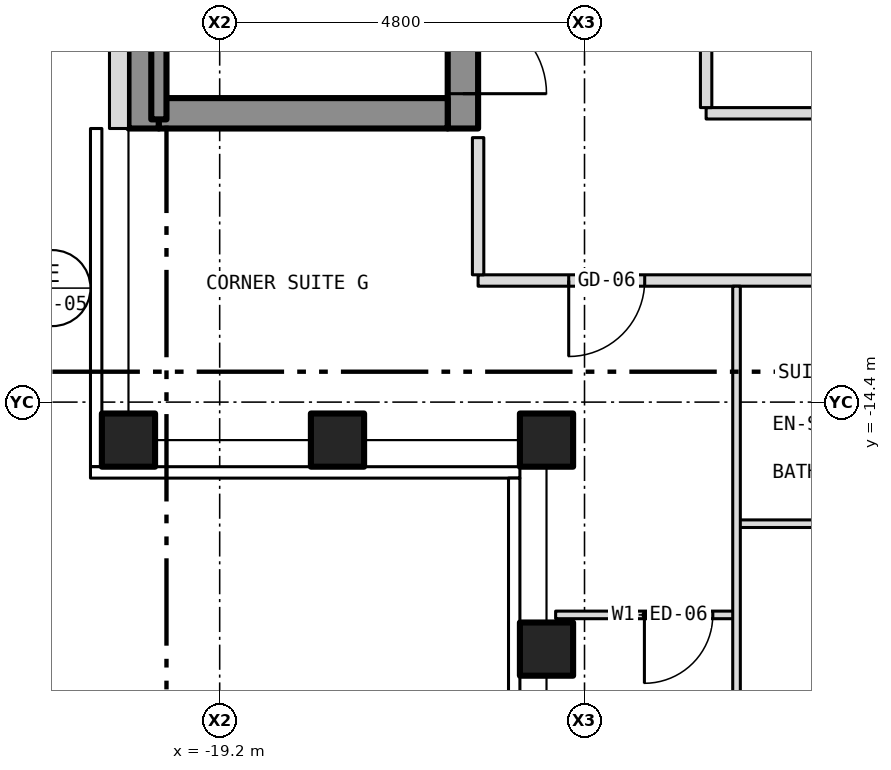
"""IFC4 building model, lengths in metres.
Left out: names, types, materials, properties, quantities, classifications, styles, units other than length and angle.
Written with IfcOpenShell. Run it as: python <this file> out.ifc"""

import sys

from ifc_helpers import new_model, si_unit, direction, frame, frame_2d, origin, origin_2d, place, context, subcontext, project, spatial, rectangle, hollow_rectangle, extrude, element, fill, save


model = new_model("IFC4")
c1 = context("Model", 3, precision=1e-05, world=origin(), true_north=direction((0.0, 1.0)))
c2 = subcontext(c1, "Body", "Model", "MODEL_VIEW")
j1 = project(units=[si_unit("LENGTHUNIT", "METRE"), si_unit("PLANEANGLEUNIT", "RADIAN")], contexts=[c1])
p1 = place(None, origin())
s1 = spatial("IfcSite", under=j1, at=p1, CompositionType="ELEMENT")
p2 = place(p1, origin())
s2 = spatial("IfcBuilding", under=s1, at=p2, CompositionType="ELEMENT")
p3 = place(p2, frame((0.0, 0.0, 194.5)))
s3 = spatial("IfcBuildingStorey", under=s2, at=p3, CompositionType="ELEMENT", Elevation=194.5)
for number, where, z_axis, x_axis in (
    (1, (-20.4, -14.9, -0.15), (0.0, 0.0, 1.0), (1.0, 0.0, 0.0)),
    (2, (-14.9, -14.9, -0.15), (0.0, 0.0, 1.0), (1.0, 0.0, 0.0)),
    (3, (-14.9, -17.65, -0.15), (0.0, 0.0, 1.0), (1.0, 0.0, 0.0)),
    (4, (-17.65, -14.9, -0.15), (0.0, 0.0, 1.0), (1.0, 0.0, 0.0)),
):
    element("IfcColumn", number, at=place(p3, frame(where, z_axis=z_axis, x_axis=x_axis)), inside=s3, PredefinedType="COLUMN", context=c2, shape_type="SweptSolid", body=[
        extrude(hollow_rectangle(XDim=0.7, YDim=0.7, WallThickness=0.04, at=origin_2d()), origin(), (0.0, 0.0, 1.0), 3.5),
    ])
p4 = place(p3, frame((-16.0, -10.8, 0.0), z_axis=(0.0, 0.0, 1.0), x_axis=(0.0, 1.0, 0.0)))
e5 = element("IfcWall", 5, at=p4, inside=s3, PredefinedType="SHEAR", context=c2, shape_type="SweptSolid", body=[
    extrude(rectangle(XDim=21.6, YDim=0.4, at=frame_2d((10.8, 0.0))), origin(), (0.0, 0.0, 1.0), 3.25),
])
p5 = place(p4, frame((9.4, 0.0, 0.0)))
e6 = element("IfcOpeningElement", 6, at=p5, cuts=e5, PredefinedType="OPENING", context=c2, shape_type="SweptSolid", body=[
    extrude(rectangle(XDim=1.1, YDim=2.1, at=frame_2d((0.55, 1.05))), frame((0.0, 0.212, 0.0), z_axis=(0.0, -1.0, 0.0), x_axis=(1.0, 0.0, 0.0)), (0.0, 0.0, 1.0), 0.424),
])
p6 = place(p4, frame((11.5, 0.0, 0.0)))
e7 = element("IfcOpeningElement", 7, at=p6, cuts=e5, PredefinedType="OPENING", context=c2, shape_type="SweptSolid", body=[
    extrude(rectangle(XDim=1.1, YDim=2.1, at=frame_2d((0.55, 1.05))), frame((0.0, 0.212, 0.0), z_axis=(0.0, -1.0, 0.0), x_axis=(1.0, 0.0, 0.0)), (0.0, 0.0, 1.0), 0.424),
])
p7 = place(p4, frame((13.6, 0.0, 0.0)))
e8 = element("IfcOpeningElement", 8, at=p7, cuts=e5, PredefinedType="OPENING", context=c2, shape_type="SweptSolid", body=[
    extrude(rectangle(XDim=1.1, YDim=2.1, at=frame_2d((0.55, 1.05))), frame((0.0, 0.212, 0.0), z_axis=(0.0, -1.0, 0.0), x_axis=(1.0, 0.0, 0.0)), (0.0, 0.0, 1.0), 0.424),
])
p8 = place(p4, frame((15.7, 0.0, 0.0)))
e9 = element("IfcOpeningElement", 9, at=p8, cuts=e5, PredefinedType="OPENING", context=c2, shape_type="SweptSolid", body=[
    extrude(rectangle(XDim=1.1, YDim=2.1, at=frame_2d((0.55, 1.05))), frame((0.0, 0.212, 0.0), z_axis=(0.0, -1.0, 0.0), x_axis=(1.0, 0.0, 0.0)), (0.0, 0.0, 1.0), 0.424),
])
p9 = place(p4, frame((17.8, 0.0, 0.0)))
e10 = element("IfcOpeningElement", 10, at=p9, cuts=e5, PredefinedType="OPENING", context=c2, shape_type="SweptSolid", body=[
    extrude(rectangle(XDim=1.1, YDim=2.1, at=frame_2d((0.55, 1.05))), frame((0.0, 0.212, 0.0), z_axis=(0.0, -1.0, 0.0), x_axis=(1.0, 0.0, 0.0)), (0.0, 0.0, 1.0), 0.424),
])
p10 = place(p4, frame((0.458, 0.0, 0.0)))
e11 = element("IfcOpeningElement", 11, at=p10, cuts=e5, PredefinedType="OPENING", context=c2, shape_type="SweptSolid", body=[
    extrude(rectangle(XDim=1.1, YDim=2.1, at=frame_2d((0.55, 1.05))), frame((0.0, 0.212, 0.0), z_axis=(0.0, -1.0, 0.0), x_axis=(1.0, 0.0, 0.0)), (0.0, 0.0, 1.0), 0.424),
])
p11 = place(p4, frame((7.5, 0.0, 0.0)))
e12 = element("IfcOpeningElement", 12, at=p11, cuts=e5, PredefinedType="OPENING", context=c2, shape_type="SweptSolid", body=[
    extrude(rectangle(XDim=1.1, YDim=2.1, at=frame_2d((0.55, 1.05))), frame((0.0, 0.212, 0.0), z_axis=(0.0, -1.0, 0.0), x_axis=(1.0, 0.0, 0.0)), (0.0, 0.0, 1.0), 0.424),
])
p12 = place(p4, frame((20.0, 0.0, 0.0)))
e13 = element("IfcOpeningElement", 13, at=p12, cuts=e5, PredefinedType="OPENING", context=c2, shape_type="SweptSolid", body=[
    extrude(rectangle(XDim=0.9, YDim=2.1, at=frame_2d((0.45, 1.05))), frame((0.0, 0.212, 0.0), z_axis=(0.0, -1.0, 0.0), x_axis=(1.0, 0.0, 0.0)), (0.0, 0.0, 1.0), 0.424),
])
p13 = place(p3, frame((-20.2, -10.8, 0.0), z_axis=(0.0, 0.0, 1.0), x_axis=(0.0, 1.0, 0.0)))
e14 = element("IfcWall", 14, at=p13, inside=s3, PredefinedType="SHEAR", context=c2, shape_type="SweptSolid", body=[
    extrude(rectangle(XDim=21.6, YDim=0.4, at=frame_2d((10.8, 0.0))), origin(), (0.0, 0.0, 1.0), 3.25),
])
p14 = place(p3, frame((-20.0, -10.6, 0.0), z_axis=(0.0, 0.0, 1.0), x_axis=(1.0, 0.0, 0.0)))
e15 = element("IfcWall", 15, at=p14, inside=s3, PredefinedType="SHEAR", context=c2, shape_type="SweptSolid", body=[
    extrude(rectangle(XDim=3.8, YDim=0.4, at=frame_2d((1.9, 0.0))), origin(), (0.0, 0.0, 1.0), 3.25),
])
p15 = place(p3, frame((-20.525, 10.8, 0.0), z_axis=(0.0, 0.0, 1.0), x_axis=(0.0, -1.0, 0.0)))
e16 = element("IfcWall", 16, at=p15, inside=s3, PredefinedType="SOLIDWALL", context=c2, shape_type="SweptSolid", body=[
    extrude(rectangle(XDim=21.6, YDim=0.25, at=frame_2d((10.8, 0.0))), origin(), (0.0, 0.0, 1.0), 3.5),
])
p16 = place(p15, frame((18.05, 0.0, 1.0)))
e17 = element("IfcOpeningElement", 17, at=p16, cuts=e16, PredefinedType="OPENING", context=c2, shape_type="SweptSolid", body=[
    extrude(rectangle(XDim=0.6, YDim=1.5, at=frame_2d((0.3, 0.75))), frame((0.0, 0.137, 0.0), z_axis=(0.0, -1.0, 0.0), x_axis=(1.0, 0.0, 0.0)), (0.0, 0.0, 1.0), 0.274),
])
p17 = place(p3, frame((-14.78, -17.2, 0.0), z_axis=(0.0, 0.0, 1.0), x_axis=(1.0, 0.0, 0.0)))
e18 = element("IfcWall", 18, at=p17, inside=s3, PredefinedType="PARTITIONING", context=c2, shape_type="SweptSolid", body=[
    extrude(rectangle(XDim=2.38, YDim=0.1, at=frame_2d((1.19, 0.0))), origin(), (0.0, 0.0, 1.0), 3.35),
])
p18 = place(p17, frame((1.168, 0.0, 0.0)))
e19 = element("IfcOpeningElement", 19, at=p18, cuts=e18, PredefinedType="OPENING", context=c2, shape_type="SweptSolid", body=[
    extrude(rectangle(XDim=0.9, YDim=2.1, at=frame_2d((0.45, 1.05))), frame((0.0, 0.062, 0.0), z_axis=(0.0, -1.0, 0.0), x_axis=(1.0, 0.0, 0.0)), (0.0, 0.0, 1.0), 0.124),
])
p19 = place(p3, frame((-12.4, -16.0, 0.0), z_axis=(0.0, 0.0, 1.0), x_axis=(1.0, 0.0, 0.0)))
e20 = element("IfcWall", 20, at=p19, inside=s3, PredefinedType="PARTITIONING", context=c2, shape_type="SweptSolid", body=[
    extrude(rectangle(XDim=2.2, YDim=0.1, at=frame_2d((1.1, 0.0))), origin(), (0.0, 0.0, 1.0), 3.35),
])
p20 = place(p3, frame((-15.8, -12.8, 0.0), z_axis=(0.0, 0.0, 1.0), x_axis=(1.0, 0.0, 0.0)))
e21 = element("IfcWall", 21, at=p20, inside=s3, PredefinedType="PARTITIONING", context=c2, shape_type="SweptSolid", body=[
    extrude(rectangle(XDim=31.6, YDim=0.15, at=frame_2d((15.8, 0.0))), origin(), (0.0, 0.0, 1.0), 3.35),
])
p21 = place(p20, frame((10.582, 0.0, 0.0)))
e22 = element("IfcOpeningElement", 22, at=p21, cuts=e21, PredefinedType="OPENING", context=c2, shape_type="SweptSolid", body=[
    extrude(rectangle(XDim=1.0, YDim=2.1, at=frame_2d((0.5, 1.05))), frame((0.0, 0.087, 0.0), z_axis=(0.0, -1.0, 0.0), x_axis=(1.0, 0.0, 0.0)), (0.0, 0.0, 1.0), 0.174),
])
p22 = place(p20, frame((15.35, 0.0, 0.0)))
e23 = element("IfcOpeningElement", 23, at=p22, cuts=e21, PredefinedType="OPENING", context=c2, shape_type="SweptSolid", body=[
    extrude(rectangle(XDim=0.9, YDim=2.1, at=frame_2d((0.45, 1.05))), frame((0.0, 0.087, 0.0), z_axis=(0.0, -1.0, 0.0), x_axis=(1.0, 0.0, 0.0)), (0.0, 0.0, 1.0), 0.174),
])
p23 = place(p20, frame((25.482, 0.0, 0.0)))
e24 = element("IfcOpeningElement", 24, at=p23, cuts=e21, PredefinedType="OPENING", context=c2, shape_type="SweptSolid", body=[
    extrude(rectangle(XDim=1.0, YDim=2.1, at=frame_2d((0.5, 1.05))), frame((0.0, 0.087, 0.0), z_axis=(0.0, -1.0, 0.0), x_axis=(1.0, 0.0, 0.0)), (0.0, 0.0, 1.0), 0.174),
])
p24 = place(p20, frame((1.192, 0.0, 0.0)))
e25 = element("IfcOpeningElement", 25, at=p24, cuts=e21, PredefinedType="OPENING", context=c2, shape_type="SweptSolid", body=[
    extrude(rectangle(XDim=1.0, YDim=2.1, at=frame_2d((0.5, 1.05))), frame((0.0, 0.087, 0.0), z_axis=(0.0, -1.0, 0.0), x_axis=(1.0, 0.0, 0.0)), (0.0, 0.0, 1.0), 0.174),
])
p25 = place(p20, frame((29.409, 0.0, 0.0)))
e26 = element("IfcOpeningElement", 26, at=p25, cuts=e21, PredefinedType="OPENING", context=c2, shape_type="SweptSolid", body=[
    extrude(rectangle(XDim=1.0, YDim=2.1, at=frame_2d((0.5, 1.05))), frame((0.0, 0.087, 0.0), z_axis=(0.0, -1.0, 0.0), x_axis=(1.0, 0.0, 0.0)), (0.0, 0.0, 1.0), 0.174),
])
p26 = place(p3, frame((-12.8, -10.6, 0.0), z_axis=(0.0, 0.0, 1.0), x_axis=(1.0, 0.0, 0.0)))
e27 = element("IfcWall", 27, at=p26, inside=s3, PredefinedType="PARTITIONING", context=c2, shape_type="SweptSolid", body=[
    extrude(rectangle(XDim=20.3, YDim=0.15, at=frame_2d((10.15, 0.0))), origin(), (0.0, 0.0, 1.0), 3.35),
])
p27 = place(p3, frame((-20.0, -10.68, 0.0), z_axis=(0.0, 0.0, 1.0), x_axis=(0.0, 1.0, 0.0)))
e28 = element("IfcWall", 28, at=p27, inside=s3, PredefinedType="SHEAR", context=c2, shape_type="SweptSolid", body=[
    extrude(rectangle(XDim=6.98, YDim=0.2, at=frame_2d((3.49, 0.0))), origin(), (0.0, 0.0, 1.0), 3.25),
])
p28 = place(p3, frame((-15.8, -12.725, 0.0), z_axis=(0.0, 0.0, 1.0), x_axis=(0.0, 1.0, 0.0)))
e29 = element("IfcWall", 29, at=p28, inside=s3, PredefinedType="PARTITIONING", context=c2, shape_type="SweptSolid", body=[
    extrude(rectangle(XDim=1.805, YDim=0.15, at=frame_2d((0.903, 0.0))), origin(), (0.0, 0.0, 1.0), 3.35),
])
p29 = place(p3, frame((-12.8, -10.525, 0.0), z_axis=(0.0, 0.0, 1.0), x_axis=(0.0, 1.0, 0.0)))
e30 = element("IfcWall", 30, at=p29, inside=s3, PredefinedType="PARTITIONING", context=c2, shape_type="SweptSolid", body=[
    extrude(rectangle(XDim=8.525, YDim=0.15, at=frame_2d((4.262, 0.0))), origin(), (0.0, 0.0, 1.0), 3.35),
])
p30 = place(p3, frame((-12.4, -20.78, 0.0), z_axis=(0.0, 0.0, 1.0), x_axis=(0.0, 1.0, 0.0)))
e31 = element("IfcWall", 31, at=p30, inside=s3, PredefinedType="PARTITIONING", context=c2, shape_type="SweptSolid", body=[
    extrude(rectangle(XDim=7.905, YDim=0.1, at=frame_2d((3.953, 0.0))), origin(), (0.0, 0.0, 1.0), 3.35),
])
p31 = place(p10, origin())
e32 = element("IfcDoor", 32, at=p31, inside=s3, OperationType="SINGLE_SWING_LEFT", PredefinedType="DOOR", context=c2, shape_type="SweptSolid", body=[
    extrude(rectangle(XDim=1.1, YDim=2.1, at=frame_2d((0.55, 1.05))), frame((0.0, 0.025, 0.0), z_axis=(0.0, -1.0, 0.0), x_axis=(1.0, 0.0, 0.0)), (0.0, 0.0, 1.0), 0.05),
])
fill(e11, e32)
p32 = place(p18, origin())
e33 = element("IfcDoor", 33, at=p32, inside=s3, OperationType="SINGLE_SWING_LEFT", PredefinedType="DOOR", context=c2, shape_type="SweptSolid", body=[
    extrude(rectangle(XDim=0.9, YDim=2.1, at=frame_2d((0.45, 1.05))), frame((0.0, 0.025, 0.0), z_axis=(0.0, -1.0, 0.0), x_axis=(1.0, 0.0, 0.0)), (0.0, 0.0, 1.0), 0.05),
])
fill(e19, e33)
p33 = place(p24, origin())
e34 = element("IfcDoor", 34, at=p33, inside=s3, OperationType="SINGLE_SWING_LEFT", PredefinedType="DOOR", context=c2, shape_type="SweptSolid", body=[
    extrude(rectangle(XDim=1.0, YDim=2.1, at=frame_2d((0.5, 1.05))), frame((0.0, 0.025, 0.0), z_axis=(0.0, -1.0, 0.0), x_axis=(1.0, 0.0, 0.0)), (0.0, 0.0, 1.0), 0.05),
])
fill(e25, e34)
save(model, sys.argv[1])
